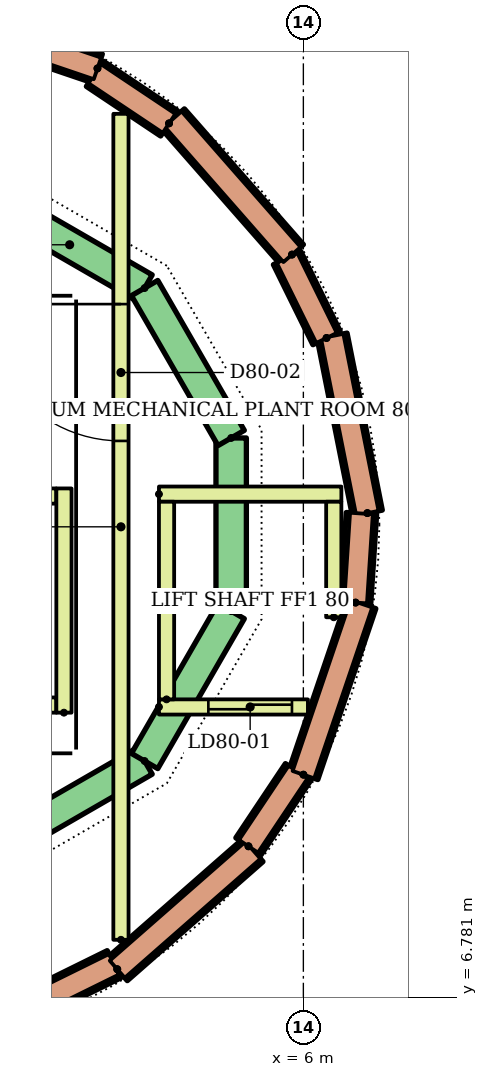
"""IFC4 building model, lengths in metres.
Left out: names, types, materials, properties, quantities, classifications, styles, units other than length and angle.
Written with IfcOpenShell. Run it as: python <this file> out.ifc"""

import sys

from ifc_helpers import new_model, si_unit, direction, frame, frame_2d, origin, place, context, subcontext, project, spatial, rectangle, extrude, element, fill, save


model = new_model("IFC4")
c1 = context("Model", 3, precision=1e-05, world=origin(), true_north=direction((0.0, 1.0)))
c2 = subcontext(c1, "Body", "Model", "MODEL_VIEW")
j1 = project(units=[si_unit("LENGTHUNIT", "METRE"), si_unit("PLANEANGLEUNIT", "RADIAN")], contexts=[c1])
p1 = place(None, origin())
s1 = spatial("IfcSite", under=j1, at=p1, CompositionType="ELEMENT")
p2 = place(p1, origin())
s2 = spatial("IfcBuilding", under=s1, at=p2, CompositionType="ELEMENT")
p3 = place(p2, frame((0.0, 0.0, 313.4)))
s3 = spatial("IfcBuildingStorey", under=s2, at=p3, CompositionType="ELEMENT", Elevation=313.4)
p4 = place(p3, frame((6.842, 13.15, 0.0), z_axis=(0.0, 0.0, 1.0), x_axis=(-0.195127507542, 0.980777883009, 0.0)))
e1 = element("IfcWall", 1, at=p4, inside=s3, PredefinedType="STANDARD", context=c2, shape_type="SweptSolid", body=[
    extrude(rectangle(XDim=2.375, YDim=0.4, at=frame_2d((1.188, 0.0))), origin(), (0.0, 0.0, 1.0), 4.58),
])
p5 = place(p3, frame((6.305, 15.454, 0.0), z_axis=(0.0, 0.0, 1.0), x_axis=(-0.442134435107, 0.896948795246, 0.0)))
e2 = element("IfcWall", 2, at=p5, inside=s3, PredefinedType="STANDARD", context=c2, shape_type="SweptSolid", body=[
    extrude(rectangle(XDim=1.175, YDim=0.4, at=frame_2d((0.587, 0.0))), origin(), (0.0, 0.0, 1.0), 4.58),
])
p6 = place(p3, frame((5.85, 16.552, 0.0), z_axis=(0.0, 0.0, 1.0), x_axis=(-0.659326702302, 0.751856568523, 0.0)))
e3 = element("IfcWall", 3, at=p6, inside=s3, PredefinedType="STANDARD", context=c2, shape_type="SweptSolid", body=[
    extrude(rectangle(XDim=2.375, YDim=0.4, at=frame_2d((1.188, 0.0))), origin(), (0.0, 0.0, 1.0), 4.58),
])
p7 = place(p3, frame((4.233, 18.278, 0.0), z_axis=(0.0, 0.0, 1.0), x_axis=(-0.831506353537, 0.55551524194, 0.0)))
e4 = element("IfcWall", 4, at=p7, inside=s3, PredefinedType="STANDARD", context=c2, shape_type="SweptSolid", body=[
    extrude(rectangle(XDim=1.175, YDim=0.4, at=frame_2d((0.587, 0.0))), origin(), (0.0, 0.0, 1.0), 4.58),
])
p8 = place(p3, frame((3.291, 19.001, 0.0), z_axis=(0.0, 0.0, 1.0), x_axis=(-0.946921154093, 0.321465904771, 0.0)))
e5 = element("IfcWall", 5, at=p8, inside=s3, PredefinedType="STANDARD", context=c2, shape_type="SweptSolid", body=[
    extrude(rectangle(XDim=2.375, YDim=0.4, at=frame_2d((1.188, 0.0))), origin(), (0.0, 0.0, 1.0), 4.58),
])
p9 = place(p3, frame((2.454, 6.695, 0.0), z_axis=(0.0, 0.0, 1.0), x_axis=(0.896948795246, 0.442134435107, 0.0)))
e6 = element("IfcWall", 6, at=p9, inside=s3, PredefinedType="STANDARD", context=c2, shape_type="SweptSolid", body=[
    extrude(rectangle(XDim=1.175, YDim=0.4, at=frame_2d((0.587, 0.0))), origin(), (0.0, 0.0, 1.0), 4.58),
])
p10 = place(p3, frame((3.552, 7.15, 0.0), z_axis=(0.0, 0.0, 1.0), x_axis=(0.751856568523, 0.659326702302, 0.0)))
e7 = element("IfcWall", 7, at=p10, inside=s3, PredefinedType="STANDARD", context=c2, shape_type="SweptSolid", body=[
    extrude(rectangle(XDim=2.375, YDim=0.4, at=frame_2d((1.188, 0.0))), origin(), (0.0, 0.0, 1.0), 4.58),
])
p11 = place(p3, frame((5.278, 8.767, 0.0), z_axis=(0.0, 0.0, 1.0), x_axis=(0.55551524194, 0.831506353537, 0.0)))
e8 = element("IfcWall", 8, at=p11, inside=s3, PredefinedType="STANDARD", context=c2, shape_type="SweptSolid", body=[
    extrude(rectangle(XDim=1.175, YDim=0.4, at=frame_2d((0.587, 0.0))), origin(), (0.0, 0.0, 1.0), 4.58),
])
p12 = place(p3, frame((6.001, 9.709, 0.0), z_axis=(0.0, 0.0, 1.0), x_axis=(0.321465904771, 0.946921154093, 0.0)))
e9 = element("IfcWall", 9, at=p12, inside=s3, PredefinedType="STANDARD", context=c2, shape_type="SweptSolid", body=[
    extrude(rectangle(XDim=2.375, YDim=0.4, at=frame_2d((1.188, 0.0))), origin(), (0.0, 0.0, 1.0), 4.58),
])
p13 = place(p3, frame((6.687, 11.973, 0.0), z_axis=(0.0, 0.0, 1.0), x_axis=(0.065470561939, 0.997854501177, 0.0)))
e10 = element("IfcWall", 10, at=p13, inside=s3, PredefinedType="STANDARD", context=c2, shape_type="SweptSolid", body=[
    extrude(rectangle(XDim=1.175, YDim=0.4, at=frame_2d((0.587, 0.0))), origin(), (0.0, 0.0, 1.0), 4.58),
])
p14 = place(p3, frame((6.842, 13.15, 5.0), z_axis=(0.0, 0.0, 1.0), x_axis=(-0.195127507542, 0.980777883009, 0.0)))
e11 = element("IfcWall", 11, at=p14, inside=s3, PredefinedType="PARAPET", context=c2, shape_type="SweptSolid", body=[
    extrude(rectangle(XDim=2.375, YDim=0.3, at=frame_2d((1.188, 0.0))), origin(), (0.0, 0.0, 1.0), 0.9),
])
p15 = place(p3, frame((6.305, 15.454, 5.0), z_axis=(0.0, 0.0, 1.0), x_axis=(-0.442134435107, 0.896948795246, 0.0)))
e12 = element("IfcWall", 12, at=p15, inside=s3, PredefinedType="PARAPET", context=c2, shape_type="SweptSolid", body=[
    extrude(rectangle(XDim=1.175, YDim=0.3, at=frame_2d((0.587, 0.0))), origin(), (0.0, 0.0, 1.0), 0.9),
])
p16 = place(p3, frame((5.85, 16.552, 5.0), z_axis=(0.0, 0.0, 1.0), x_axis=(-0.659326702302, 0.751856568523, 0.0)))
e13 = element("IfcWall", 13, at=p16, inside=s3, PredefinedType="PARAPET", context=c2, shape_type="SweptSolid", body=[
    extrude(rectangle(XDim=2.375, YDim=0.3, at=frame_2d((1.188, 0.0))), origin(), (0.0, 0.0, 1.0), 0.9),
])
p17 = place(p3, frame((4.233, 18.278, 5.0), z_axis=(0.0, 0.0, 1.0), x_axis=(-0.831506353537, 0.55551524194, 0.0)))
e14 = element("IfcWall", 14, at=p17, inside=s3, PredefinedType="PARAPET", context=c2, shape_type="SweptSolid", body=[
    extrude(rectangle(XDim=1.175, YDim=0.3, at=frame_2d((0.587, 0.0))), origin(), (0.0, 0.0, 1.0), 0.9),
])
p18 = place(p3, frame((3.291, 19.001, 5.0), z_axis=(0.0, 0.0, 1.0), x_axis=(-0.946921154093, 0.321465904771, 0.0)))
e15 = element("IfcWall", 15, at=p18, inside=s3, PredefinedType="PARAPET", context=c2, shape_type="SweptSolid", body=[
    extrude(rectangle(XDim=2.375, YDim=0.3, at=frame_2d((1.188, 0.0))), origin(), (0.0, 0.0, 1.0), 0.9),
])
p19 = place(p3, frame((2.454, 6.695, 5.0), z_axis=(0.0, 0.0, 1.0), x_axis=(0.896948795246, 0.442134435107, 0.0)))
e16 = element("IfcWall", 16, at=p19, inside=s3, PredefinedType="PARAPET", context=c2, shape_type="SweptSolid", body=[
    extrude(rectangle(XDim=1.175, YDim=0.3, at=frame_2d((0.587, 0.0))), origin(), (0.0, 0.0, 1.0), 0.9),
])
p20 = place(p3, frame((3.552, 7.15, 5.0), z_axis=(0.0, 0.0, 1.0), x_axis=(0.751856568523, 0.659326702302, 0.0)))
e17 = element("IfcWall", 17, at=p20, inside=s3, PredefinedType="PARAPET", context=c2, shape_type="SweptSolid", body=[
    extrude(rectangle(XDim=2.375, YDim=0.3, at=frame_2d((1.188, 0.0))), origin(), (0.0, 0.0, 1.0), 0.9),
])
p21 = place(p3, frame((5.278, 8.767, 5.0), z_axis=(0.0, 0.0, 1.0), x_axis=(0.55551524194, 0.831506353537, 0.0)))
e18 = element("IfcWall", 18, at=p21, inside=s3, PredefinedType="PARAPET", context=c2, shape_type="SweptSolid", body=[
    extrude(rectangle(XDim=1.175, YDim=0.3, at=frame_2d((0.587, 0.0))), origin(), (0.0, 0.0, 1.0), 0.9),
])
p22 = place(p3, frame((6.001, 9.709, 5.0), z_axis=(0.0, 0.0, 1.0), x_axis=(0.321465904771, 0.946921154093, 0.0)))
e19 = element("IfcWall", 19, at=p22, inside=s3, PredefinedType="PARAPET", context=c2, shape_type="SweptSolid", body=[
    extrude(rectangle(XDim=2.375, YDim=0.3, at=frame_2d((1.188, 0.0))), origin(), (0.0, 0.0, 1.0), 0.9),
])
p23 = place(p3, frame((6.687, 11.973, 5.0), z_axis=(0.0, 0.0, 1.0), x_axis=(0.065470561939, 0.997854501177, 0.0)))
e20 = element("IfcWall", 20, at=p23, inside=s3, PredefinedType="PARAPET", context=c2, shape_type="SweptSolid", body=[
    extrude(rectangle(XDim=1.175, YDim=0.3, at=frame_2d((0.587, 0.0))), origin(), (0.0, 0.0, 1.0), 0.9),
])
for number, where, z_axis, x_axis in (
    (21, (3.911, 16.111, 5.0), (0.0, 0.0, 1.0), (-0.866, 0.5, 0.0)),
    (22, (1.939, 8.75, 5.0), (0.0, 0.0, 1.0), (0.866, 0.5, 0.0)),
    (23, (3.911, 9.889, 5.0), (0.0, 0.0, 1.0), (0.5, 0.866, 0.0)),
):
    element("IfcWall", number, at=place(p3, frame(where, z_axis=z_axis, x_axis=x_axis)), inside=s3, PredefinedType="STANDARD", context=c2, shape_type="SweptSolid", body=[
        extrude(rectangle(XDim=2.278, YDim=0.4, at=frame_2d((1.139, 0.0))), origin(), (0.0, 0.0, 1.0), 4.3),
    ])
p24 = place(p3, frame((5.05, 11.861, 5.0), z_axis=(0.0, 0.0, 1.0), x_axis=(0.0, 1.0, 0.0)))
e24 = element("IfcWall", 24, at=p24, inside=s3, PredefinedType="STANDARD", context=c2, shape_type="SweptSolid", body=[
    extrude(rectangle(XDim=2.278, YDim=0.4, at=frame_2d((1.139, 0.0))), origin(), (0.0, 0.0, 1.0), 4.3),
])
p25 = place(p3, frame((5.05, 14.139, 5.0), z_axis=(0.0, 0.0, 1.0), x_axis=(-0.499966809449, 0.86604456551, 0.0)))
e25 = element("IfcWall", 25, at=p25, inside=s3, PredefinedType="STANDARD", context=c2, shape_type="SweptSolid", body=[
    extrude(rectangle(XDim=2.278, YDim=0.4, at=frame_2d((1.139, 0.0))), origin(), (0.0, 0.0, 1.0), 4.3),
])
p26 = place(p3, frame((3.6, 7.537, 0.0), z_axis=(0.0, 0.0, 1.0), x_axis=(0.0, 1.0, 0.0)))
e26 = element("IfcWall", 26, at=p26, inside=s3, PredefinedType="PARTITIONING", context=c2, shape_type="SweptSolid", body=[
    extrude(rectangle(XDim=10.867, YDim=0.2, at=frame_2d((5.433, 0.0))), origin(), (0.0, 0.0, 1.0), 5.0),
])
p27 = place(p26, frame((6.563, 0.0, 0.0)))
e27 = element("IfcOpeningElement", 27, at=p27, cuts=e26, PredefinedType="OPENING", context=c2, shape_type="SweptSolid", body=[
    extrude(rectangle(XDim=1.8, YDim=2.1, at=frame_2d((0.9, 1.05))), frame((0.0, 0.11, 0.0), z_axis=(0.0, -1.0, 0.0), x_axis=(1.0, 0.0, 0.0)), (0.0, 0.0, 1.0), 0.22),
])
for number, where in (
    (28, (-2.75, 10.625, 0.0)),
    (29, (-2.75, 13.375, 0.0)),
):
    element("IfcWall", number, at=place(p3, frame(where)), inside=s3, PredefinedType="PARTITIONING", context=c2, shape_type="SweptSolid", body=[
        extrude(rectangle(XDim=5.5, YDim=0.2, at=frame_2d((2.75, 0.0))), origin(), (0.0, 0.0, 1.0), 5.0),
    ])
p28 = place(p3, frame((2.85, 10.525, 0.0), z_axis=(0.0, 0.0, 1.0), x_axis=(0.0, 1.0, 0.0)))
e30 = element("IfcWall", 30, at=p28, inside=s3, PredefinedType="PARTITIONING", context=c2, shape_type="SweptSolid", body=[
    extrude(rectangle(XDim=2.95, YDim=0.2, at=frame_2d((1.475, 0.0))), origin(), (0.0, 0.0, 1.0), 5.0),
])
p29 = place(p3, frame((4.1, 10.6, 0.0)))
e31 = element("IfcWall", 31, at=p29, inside=s3, PredefinedType="PARTITIONING", context=c2, shape_type="SweptSolid", body=[
    extrude(rectangle(XDim=1.96, YDim=0.2, at=frame_2d((0.98, 0.0))), origin(), (0.0, 0.0, 1.0), 5.0),
])
p30 = place(p29, frame((0.65, 0.0, 0.0)))
e32 = element("IfcOpeningElement", 32, at=p30, cuts=e31, PredefinedType="OPENING", context=c2, shape_type="SweptSolid", body=[
    extrude(rectangle(XDim=1.1, YDim=2.1, at=frame_2d((0.55, 1.05))), frame((0.0, 0.11, 0.0), z_axis=(0.0, -1.0, 0.0), x_axis=(1.0, 0.0, 0.0)), (0.0, 0.0, 1.0), 0.22),
])
p31 = place(p3, frame((4.1, 13.4, 0.0)))
e33 = element("IfcWall", 33, at=p31, inside=s3, PredefinedType="PARTITIONING", context=c2, shape_type="SweptSolid", body=[
    extrude(rectangle(XDim=2.4, YDim=0.2, at=frame_2d((1.2, 0.0))), origin(), (0.0, 0.0, 1.0), 5.0),
])
p32 = place(p3, frame((6.4, 11.78, 0.0), z_axis=(0.0, 0.0, 1.0), x_axis=(0.0, 1.0, 0.0)))
e34 = element("IfcWall", 34, at=p32, inside=s3, PredefinedType="PARTITIONING", context=c2, shape_type="SweptSolid", body=[
    extrude(rectangle(XDim=1.52, YDim=0.2, at=frame_2d((0.76, 0.0))), origin(), (0.0, 0.0, 1.0), 5.0),
])
p33 = place(p3, frame((4.2, 10.7, 0.0), z_axis=(0.0, 0.0, 1.0), x_axis=(0.0, 1.0, 0.0)))
e35 = element("IfcWall", 35, at=p33, inside=s3, PredefinedType="PARTITIONING", context=c2, shape_type="SweptSolid", body=[
    extrude(rectangle(XDim=2.6, YDim=0.2, at=frame_2d((1.3, 0.0))), origin(), (0.0, 0.0, 1.0), 5.0),
])
p34 = place(p30, origin())
e36 = element("IfcDoor", 36, at=p34, inside=s3, OperationType="SLIDING_TO_LEFT", PredefinedType="DOOR", context=c2, shape_type="SweptSolid", body=[
    extrude(rectangle(XDim=1.1, YDim=2.1, at=frame_2d((0.55, 1.05))), frame((0.0, 0.025, 0.0), z_axis=(0.0, -1.0, 0.0), x_axis=(1.0, 0.0, 0.0)), (0.0, 0.0, 1.0), 0.05),
])
fill(e32, e36)
p35 = place(p27, origin())
e37 = element("IfcDoor", 37, at=p35, inside=s3, OperationType="DOUBLE_DOOR_SINGLE_SWING", PredefinedType="DOOR", context=c2, shape_type="SweptSolid", body=[
    extrude(rectangle(XDim=1.8, YDim=2.1, at=frame_2d((0.9, 1.05))), frame((0.0, 0.025, 0.0), z_axis=(0.0, -1.0, 0.0), x_axis=(1.0, 0.0, 0.0)), (0.0, 0.0, 1.0), 0.05),
])
fill(e27, e37)
save(model, sys.argv[1])
